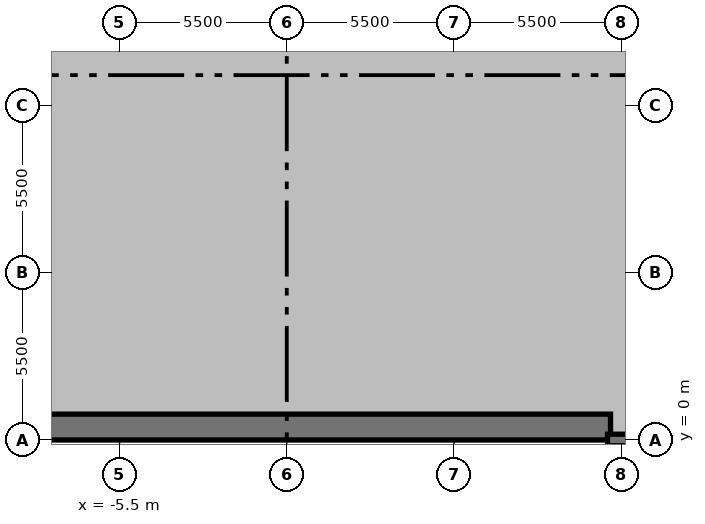
"""IFC4 building model, lengths in metres.
Left out: names, types, materials, properties, quantities, classifications, styles, units other than length and angle.
Written with IfcOpenShell. Run it as: python <this file> out.ifc"""

import sys

from ifc_helpers import new_model, si_unit, direction, frame, frame_2d, origin, origin_2d, place, context, subcontext, project, spatial, rectangle, extrude, source, transform, mapped, element, fill, save


model = new_model("IFC4")
c1 = context("Model", 3, precision=1e-05, world=origin(), true_north=direction((0.0, 1.0)))
c2 = subcontext(c1, "Body", "Model", "MODEL_VIEW")
j1 = project(units=[si_unit("LENGTHUNIT", "METRE"), si_unit("PLANEANGLEUNIT", "RADIAN")], contexts=[c1])
p1 = place(None, origin())
s1 = spatial("IfcSite", under=j1, at=p1, CompositionType="ELEMENT")
p2 = place(p1, origin())
s2 = spatial("IfcBuilding", under=s1, at=p2, CompositionType="ELEMENT")
p3 = place(p2, origin())
s3 = spatial("IfcBuildingStorey", under=s2, at=p3, CompositionType="ELEMENT", Elevation=0.0)
p4 = place(p3, frame((-10.65, 0.425, 0.0), z_axis=(0.0, 0.0, 1.0), x_axis=(1.0, 0.0, 0.0)))
e1 = element("IfcWall", 1, at=p4, inside=s3, PredefinedType="SHEAR", context=c2, shape_type="SweptSolid", body=[
    extrude(rectangle(XDim=21.3, YDim=0.85, at=frame_2d((10.65, 0.0))), origin(), (0.0, 0.0, 1.0), 5.15),
])
p5 = place(p3, frame((10.575, 0.425, 0.0), z_axis=(0.0, 0.0, 1.0), x_axis=(0.0, 1.0, 0.0)))
e2 = element("IfcWall", 2, at=p5, inside=s3, PredefinedType="SHEAR", context=c2, shape_type="SweptSolid", body=[
    extrude(rectangle(XDim=15.75, YDim=0.85, at=frame_2d((7.875, 0.0))), origin(), (0.0, 0.0, 1.0), 5.15),
])
p6 = place(p5, frame((9.125, 0.0, 0.0)))
e3 = element("IfcOpeningElement", 3, at=p6, cuts=e2, PredefinedType="OPENING", context=c2, shape_type="SweptSolid", body=[
    extrude(rectangle(XDim=1.1, YDim=2.2, at=frame_2d((0.55, 1.1))), frame((0.0, 0.435, 0.0), z_axis=(0.0, -1.0, 0.0), x_axis=(1.0, 0.0, 0.0)), (0.0, 0.0, 1.0), 0.87),
])
p7 = place(p3, frame((-5.5, 0.425, 0.0), z_axis=(0.0, 0.0, 1.0), x_axis=(0.0, 1.0, 0.0)))
e4 = element("IfcWall", 4, at=p7, inside=s3, PredefinedType="SHEAR", context=c2, shape_type="SweptSolid", body=[
    extrude(rectangle(XDim=15.75, YDim=0.4, at=frame_2d((7.875, 0.0))), origin(), (0.0, 0.0, 1.0), 5.15),
])
p8 = place(p7, frame((9.075, 0.0, 0.0)))
e5 = element("IfcOpeningElement", 5, at=p8, cuts=e4, PredefinedType="OPENING", context=c2, shape_type="SweptSolid", body=[
    extrude(rectangle(XDim=1.1, YDim=2.2, at=frame_2d((0.55, 1.1))), frame((0.0, 0.21, 0.0), z_axis=(0.0, -1.0, 0.0), x_axis=(1.0, 0.0, 0.0)), (0.0, 0.0, 1.0), 0.42),
])
p9 = place(p3, frame((5.5, 0.425, 0.0), z_axis=(0.0, 0.0, 1.0), x_axis=(0.0, 1.0, 0.0)))
e6 = element("IfcWall", 6, at=p9, inside=s3, PredefinedType="SHEAR", context=c2, shape_type="SweptSolid", body=[
    extrude(rectangle(XDim=15.75, YDim=0.4, at=frame_2d((7.875, 0.0))), origin(), (0.0, 0.0, 1.0), 5.15),
])
p10 = place(p9, frame((9.075, 0.0, 0.0)))
e7 = element("IfcOpeningElement", 7, at=p10, cuts=e6, PredefinedType="OPENING", context=c2, shape_type="SweptSolid", body=[
    extrude(rectangle(XDim=1.1, YDim=2.2, at=frame_2d((0.55, 1.1))), frame((0.0, 0.21, 0.0), z_axis=(0.0, -1.0, 0.0), x_axis=(1.0, 0.0, 0.0)), (0.0, 0.0, 1.0), 0.42),
])
m1 = source(origin(), c2, "Body", "SweptSolid", [
    extrude(rectangle(XDim=0.45, YDim=0.95, at=origin_2d()), origin(), (0.0, 0.0, 1.0), 5.5),
])
for number, where, z_axis, x_axis in (
    (8, (-5.5, 0.45, 0.0), (0.0, 0.0, 1.0), (1.0, 0.0, 0.0)),
    (9, (5.5, 0.45, 0.0), (0.0, 0.0, 1.0), (1.0, 0.0, 0.0)),
    (10, (10.65, 0.3, 0.0), (0.0, 0.0, 1.0), (1.0, 0.0, 0.0)),
):
    element("IfcColumn", number, at=place(p3, frame(where, z_axis=z_axis, x_axis=x_axis)), inside=s3, PredefinedType="PILASTER", context=c2, shape_type="MappedRepresentation", body=[
        mapped(m1, transform((0.0, 0.0, 0.0), scale=1.0)),
    ])
p11 = place(p3, frame((32.5, 0.0, 0.0), z_axis=(0.0, 0.0, 1.0), x_axis=(-1.0, 0.0, 0.0)))
e11 = element("IfcWall", 11, at=p11, inside=s3, PredefinedType="SOLIDWALL", context=c2, shape_type="SweptSolid", body=[
    extrude(rectangle(XDim=21.95, YDim=0.38, at=frame_2d((10.975, 0.0))), origin(), (0.0, 0.0, 1.0), 4.09),
])
p12 = place(p11, frame((12.05, 0.0, 0.0)))
e12 = element("IfcOpeningElement", 12, at=p12, cuts=e11, PredefinedType="OPENING", context=c2, shape_type="SweptSolid", body=[
    extrude(rectangle(XDim=1.9, YDim=2.3, at=frame_2d((0.95, 1.15))), frame((0.0, 0.2, 0.0), z_axis=(0.0, -1.0, 0.0), x_axis=(1.0, 0.0, 0.0)), (0.0, 0.0, 1.0), 0.4),
])
p13 = place(p3, frame((-6.85, 0.85, 0.0), z_axis=(0.0, 0.0, 1.0), x_axis=(0.0, 1.0, 0.0)))
e13 = element("IfcWall", 13, at=p13, inside=s3, PredefinedType="SOLIDWALL", context=c2, shape_type="SweptSolid", body=[
    extrude(rectangle(XDim=7.5, YDim=0.25, at=frame_2d((3.75, 0.0))), origin(), (0.0, 0.0, 1.0), 5.15),
])
p14 = place(p3, frame((-10.15, 8.35, 0.0), z_axis=(0.0, 0.0, 1.0), x_axis=(1.0, 0.0, 0.0)))
e14 = element("IfcWall", 14, at=p14, inside=s3, PredefinedType="SOLIDWALL", context=c2, shape_type="SweptSolid", body=[
    extrude(rectangle(XDim=4.65, YDim=0.22, at=frame_2d((2.325, 0.0))), origin(), (0.0, 0.0, 1.0), 5.15),
])
p15 = place(p14, frame((1.0, 0.0, 0.0)))
e15 = element("IfcOpeningElement", 15, at=p15, cuts=e14, PredefinedType="OPENING", context=c2, shape_type="SweptSolid", body=[
    extrude(rectangle(XDim=1.15, YDim=2.2, at=frame_2d((0.575, 1.1))), frame((0.0, 0.12, 0.0), z_axis=(0.0, -1.0, 0.0), x_axis=(1.0, 0.0, 0.0)), (0.0, 0.0, 1.0), 0.24),
])
p16 = place(p3, frame((-5.5, 11.87, 0.0), z_axis=(0.0, 0.0, 1.0), x_axis=(-1.0, 0.0, 0.0)))
e16 = element("IfcWall", 16, at=p16, inside=s3, PredefinedType="SOLIDWALL", context=c2, shape_type="SweptSolid", body=[
    extrude(rectangle(XDim=4.65, YDim=0.25, at=frame_2d((2.325, 0.0))), origin(), (0.0, 0.0, 1.0), 5.15),
])
p17 = place(p16, frame((2.95, 0.0, 0.0)))
e17 = element("IfcOpeningElement", 17, at=p17, cuts=e16, PredefinedType="OPENING", context=c2, shape_type="SweptSolid", body=[
    extrude(rectangle(XDim=1.2, YDim=2.25, at=frame_2d((0.6, 1.125))), frame((0.0, 0.135, 0.0), z_axis=(0.0, -1.0, 0.0), x_axis=(1.0, 0.0, 0.0)), (0.0, 0.0, 1.0), 0.27),
])
p18 = place(p3, frame((6.85, 0.85, 0.0), z_axis=(0.0, 0.0, 1.0), x_axis=(0.0, 1.0, 0.0)))
e18 = element("IfcWall", 18, at=p18, inside=s3, PredefinedType="SOLIDWALL", context=c2, shape_type="SweptSolid", body=[
    extrude(rectangle(XDim=7.5, YDim=0.25, at=frame_2d((3.75, 0.0))), origin(), (0.0, 0.0, 1.0), 5.15),
])
p19 = place(p3, frame((5.5, 8.35, 0.0), z_axis=(0.0, 0.0, 1.0), x_axis=(1.0, 0.0, 0.0)))
e19 = element("IfcWall", 19, at=p19, inside=s3, PredefinedType="SOLIDWALL", context=c2, shape_type="SweptSolid", body=[
    extrude(rectangle(XDim=4.65, YDim=0.22, at=frame_2d((2.325, 0.0))), origin(), (0.0, 0.0, 1.0), 5.15),
])
p20 = place(p19, frame((2.5, 0.0, 0.0)))
e20 = element("IfcOpeningElement", 20, at=p20, cuts=e19, PredefinedType="OPENING", context=c2, shape_type="SweptSolid", body=[
    extrude(rectangle(XDim=1.15, YDim=2.2, at=frame_2d((0.575, 1.1))), frame((0.0, 0.12, 0.0), z_axis=(0.0, -1.0, 0.0), x_axis=(1.0, 0.0, 0.0)), (0.0, 0.0, 1.0), 0.24),
])
p21 = place(p3, frame((10.15, 11.87, 0.0), z_axis=(0.0, 0.0, 1.0), x_axis=(-1.0, 0.0, 0.0)))
e21 = element("IfcWall", 21, at=p21, inside=s3, PredefinedType="SOLIDWALL", context=c2, shape_type="SweptSolid", body=[
    extrude(rectangle(XDim=4.65, YDim=0.25, at=frame_2d((2.325, 0.0))), origin(), (0.0, 0.0, 1.0), 5.15),
])
p22 = place(p21, frame((0.5, 0.0, 0.0)))
e22 = element("IfcOpeningElement", 22, at=p22, cuts=e21, PredefinedType="OPENING", context=c2, shape_type="SweptSolid", body=[
    extrude(rectangle(XDim=1.2, YDim=2.25, at=frame_2d((0.6, 1.125))), frame((0.0, 0.135, 0.0), z_axis=(0.0, -1.0, 0.0), x_axis=(1.0, 0.0, 0.0)), (0.0, 0.0, 1.0), 0.27),
])
p23 = place(p3, frame((7.84, 11.87, 0.0), z_axis=(0.0, 0.0, 1.0), x_axis=(0.0, 1.0, 0.0)))
e23 = element("IfcWall", 23, at=p23, inside=s3, PredefinedType="SOLIDWALL", context=c2, shape_type="SweptSolid", body=[
    extrude(rectangle(XDim=3.88, YDim=0.22, at=frame_2d((1.94, 0.0))), origin(), (0.0, 0.0, 1.0), 5.15),
])
p24 = place(p3, frame((-5.5, 3.05, 0.0), z_axis=(0.0, 0.0, 1.0), x_axis=(1.0, 0.0, 0.0)))
e24 = element("IfcWall", 24, at=p24, inside=s3, PredefinedType="SOLIDWALL", context=c2, shape_type="SweptSolid", body=[
    extrude(rectangle(XDim=7.32, YDim=0.22, at=frame_2d((3.66, 0.0))), origin(), (0.0, 0.0, 1.0), 5.15),
])
p25 = place(p24, frame((0.75, 0.0, 0.0)))
e25 = element("IfcOpeningElement", 25, at=p25, cuts=e24, PredefinedType="OPENING", context=c2, shape_type="SweptSolid", body=[
    extrude(rectangle(XDim=1.1, YDim=2.2, at=frame_2d((0.55, 1.1))), frame((0.0, 0.12, 0.0), z_axis=(0.0, -1.0, 0.0), x_axis=(1.0, 0.0, 0.0)), (0.0, 0.0, 1.0), 0.24),
])
p26 = place(p24, frame((3.15, 0.0, 0.0)))
e26 = element("IfcOpeningElement", 26, at=p26, cuts=e24, PredefinedType="OPENING", context=c2, shape_type="SweptSolid", body=[
    extrude(rectangle(XDim=1.1, YDim=2.2, at=frame_2d((0.55, 1.1))), frame((0.0, 0.12, 0.0), z_axis=(0.0, -1.0, 0.0), x_axis=(1.0, 0.0, 0.0)), (0.0, 0.0, 1.0), 0.24),
])
p27 = place(p24, frame((5.55, 0.0, 0.0)))
e27 = element("IfcOpeningElement", 27, at=p27, cuts=e24, PredefinedType="OPENING", context=c2, shape_type="SweptSolid", body=[
    extrude(rectangle(XDim=1.1, YDim=2.2, at=frame_2d((0.55, 1.1))), frame((0.0, 0.12, 0.0), z_axis=(0.0, -1.0, 0.0), x_axis=(1.0, 0.0, 0.0)), (0.0, 0.0, 1.0), 0.24),
])
p28 = place(p3, frame((1.8, 0.85, 0.0), z_axis=(0.0, 0.0, 1.0), x_axis=(0.0, 1.0, 0.0)))
e28 = element("IfcWall", 28, at=p28, inside=s3, PredefinedType="SOLIDWALL", context=c2, shape_type="SweptSolid", body=[
    extrude(rectangle(XDim=2.2, YDim=0.22, at=frame_2d((1.1, 0.0))), origin(), (0.0, 0.0, 1.0), 5.15),
])
for number, where, z_axis, x_axis in (
    (29, (-3.0, 0.85, 0.0), (0.0, 0.0, 1.0), (0.0, 1.0, 0.0)),
    (30, (-0.6, 0.85, 0.0), (0.0, 0.0, 1.0), (0.0, 1.0, 0.0)),
):
    element("IfcWall", number, at=place(p3, frame(where, z_axis=z_axis, x_axis=x_axis)), inside=s3, PredefinedType="SOLIDWALL", context=c2, shape_type="SweptSolid", body=[
        extrude(rectangle(XDim=2.2, YDim=0.18, at=frame_2d((1.1, 0.0))), origin(), (0.0, 0.0, 1.0), 5.15),
    ])
p29 = place(p3, frame((1.8, 3.16, 0.0), z_axis=(0.0, 0.0, 1.0), x_axis=(0.0, 1.0, 0.0)))
e31 = element("IfcWall", 31, at=p29, inside=s3, PredefinedType="PARTITIONING", context=c2, shape_type="SweptSolid", body=[
    extrude(rectangle(XDim=2.058, YDim=0.165, at=frame_2d((1.029, 0.0))), origin(), (0.0, 0.0, 1.0), 5.142),
])
p30 = place(p3, frame((3.54, 5.383, 0.0), z_axis=(0.0, 0.0, 1.0), x_axis=(0.0, 1.0, 0.0)))
e32 = element("IfcWall", 32, at=p30, inside=s3, PredefinedType="PARTITIONING", context=c2, shape_type="SweptSolid", body=[
    extrude(rectangle(XDim=2.875, YDim=0.165, at=frame_2d((1.438, 0.0))), origin(), (0.0, 0.0, 1.0), 5.142),
])
p31 = place(p30, frame((1.294, 0.0, 0.0)))
e33 = element("IfcOpeningElement", 33, at=p31, cuts=e32, PredefinedType="OPENING", context=c2, shape_type="SweptSolid", body=[
    extrude(rectangle(XDim=0.9, YDim=2.1, at=frame_2d((0.45, 1.05))), frame((0.0, 0.093, 0.0), z_axis=(0.0, -1.0, 0.0), x_axis=(1.0, 0.0, 0.0)), (0.0, 0.0, 1.0), 0.185),
])
p32 = place(p3, frame((3.54, 8.34, 0.0), z_axis=(0.0, 0.0, 1.0), x_axis=(1.0, 0.0, 0.0)))
e34 = element("IfcWall", 34, at=p32, inside=s3, PredefinedType="PARTITIONING", context=c2, shape_type="SweptSolid", body=[
    extrude(rectangle(XDim=1.88, YDim=0.165, at=frame_2d((0.94, 0.0))), origin(), (0.0, 0.0, 1.0), 5.142),
])
p33 = place(p3, frame((1.8, 5.3, 0.0), z_axis=(0.0, 0.0, 1.0), x_axis=(1.0, 0.0, 0.0)))
e35 = element("IfcWall", 35, at=p33, inside=s3, PredefinedType="PARTITIONING", context=c2, shape_type="SweptSolid", body=[
    extrude(rectangle(XDim=3.62, YDim=0.165, at=frame_2d((1.81, 0.0))), origin(), (0.0, 0.0, 1.0), 5.142),
])
p34 = place(p33, frame((0.48, 0.0, 0.0)))
e36 = element("IfcOpeningElement", 36, at=p34, cuts=e35, PredefinedType="OPENING", context=c2, shape_type="SweptSolid", body=[
    extrude(rectangle(XDim=0.9, YDim=2.1, at=frame_2d((0.45, 1.05))), frame((0.0, 0.093, 0.0), z_axis=(0.0, -1.0, 0.0), x_axis=(1.0, 0.0, 0.0)), (0.0, 0.0, 1.0), 0.185),
])
p35 = place(p3, frame((-5.5, 6.0, 0.0), z_axis=(0.0, 0.0, 1.0), x_axis=(1.0, 0.0, 0.0)))
e37 = element("IfcWall", 37, at=p35, inside=s3, PredefinedType="SOLIDWALL", context=c2, shape_type="SweptSolid", body=[
    extrude(rectangle(XDim=7.32, YDim=0.22, at=frame_2d((3.66, 0.0))), origin(), (0.0, 0.0, 1.0), 5.15),
])
p36 = place(p3, frame((-5.5, 8.3, 0.0), z_axis=(0.0, 0.0, 1.0), x_axis=(1.0, 0.0, 0.0)))
e38 = element("IfcWall", 38, at=p36, inside=s3, PredefinedType="SOLIDWALL", context=c2, shape_type="SweptSolid", body=[
    extrude(rectangle(XDim=7.32, YDim=0.22, at=frame_2d((3.66, 0.0))), origin(), (0.0, 0.0, 1.0), 5.15),
])
p37 = place(p36, frame((0.75, 0.0, 0.0)))
e39 = element("IfcOpeningElement", 39, at=p37, cuts=e38, PredefinedType="OPENING", context=c2, shape_type="SweptSolid", body=[
    extrude(rectangle(XDim=1.1, YDim=2.2, at=frame_2d((0.55, 1.1))), frame((0.0, 0.12, 0.0), z_axis=(0.0, -1.0, 0.0), x_axis=(1.0, 0.0, 0.0)), (0.0, 0.0, 1.0), 0.24),
])
p38 = place(p36, frame((3.15, 0.0, 0.0)))
e40 = element("IfcOpeningElement", 40, at=p38, cuts=e38, PredefinedType="OPENING", context=c2, shape_type="SweptSolid", body=[
    extrude(rectangle(XDim=1.1, YDim=2.2, at=frame_2d((0.55, 1.1))), frame((0.0, 0.12, 0.0), z_axis=(0.0, -1.0, 0.0), x_axis=(1.0, 0.0, 0.0)), (0.0, 0.0, 1.0), 0.24),
])
p39 = place(p36, frame((5.55, 0.0, 0.0)))
e41 = element("IfcOpeningElement", 41, at=p39, cuts=e38, PredefinedType="OPENING", context=c2, shape_type="SweptSolid", body=[
    extrude(rectangle(XDim=1.1, YDim=2.2, at=frame_2d((0.55, 1.1))), frame((0.0, 0.12, 0.0), z_axis=(0.0, -1.0, 0.0), x_axis=(1.0, 0.0, 0.0)), (0.0, 0.0, 1.0), 0.24),
])
p40 = place(p3, frame((1.8, 6.0, 0.0), z_axis=(0.0, 0.0, 1.0), x_axis=(0.0, 1.0, 0.0)))
e42 = element("IfcWall", 42, at=p40, inside=s3, PredefinedType="SOLIDWALL", context=c2, shape_type="SweptSolid", body=[
    extrude(rectangle(XDim=2.3, YDim=0.22, at=frame_2d((1.15, 0.0))), origin(), (0.0, 0.0, 1.0), 5.15),
])
for number, where, z_axis, x_axis in (
    (43, (-3.0, 6.0, 0.0), (0.0, 0.0, 1.0), (0.0, 1.0, 0.0)),
    (44, (-0.6, 6.0, 0.0), (0.0, 0.0, 1.0), (0.0, 1.0, 0.0)),
):
    element("IfcWall", number, at=place(p3, frame(where, z_axis=z_axis, x_axis=x_axis)), inside=s3, PredefinedType="SOLIDWALL", context=c2, shape_type="SweptSolid", body=[
        extrude(rectangle(XDim=2.3, YDim=0.18, at=frame_2d((1.15, 0.0))), origin(), (0.0, 0.0, 1.0), 5.15),
    ])
p41 = place(p3, frame((-5.5, 11.32, 0.0), z_axis=(0.0, 0.0, 1.0), x_axis=(1.0, 0.0, 0.0)))
e45 = element("IfcWall", 45, at=p41, inside=s3, PredefinedType="SOLIDWALL", context=c2, shape_type="SweptSolid", body=[
    extrude(rectangle(XDim=7.32, YDim=0.22, at=frame_2d((3.66, 0.0))), origin(), (0.0, 0.0, 1.0), 5.15),
])
p42 = place(p3, frame((1.8, 11.32, 0.0), z_axis=(0.0, 0.0, 1.0), x_axis=(0.0, 1.0, 0.0)))
e46 = element("IfcWall", 46, at=p42, inside=s3, PredefinedType="SOLIDWALL", context=c2, shape_type="SweptSolid", body=[
    extrude(rectangle(XDim=2.3, YDim=0.22, at=frame_2d((1.15, 0.0))), origin(), (0.0, 0.0, 1.0), 5.15),
])
for number, where, z_axis, x_axis in (
    (47, (-3.0, 11.32, 0.0), (0.0, 0.0, 1.0), (0.0, 1.0, 0.0)),
    (48, (-0.6, 11.32, 0.0), (0.0, 0.0, 1.0), (0.0, 1.0, 0.0)),
):
    element("IfcWall", number, at=place(p3, frame(where, z_axis=z_axis, x_axis=x_axis)), inside=s3, PredefinedType="SOLIDWALL", context=c2, shape_type="SweptSolid", body=[
        extrude(rectangle(XDim=2.3, YDim=0.18, at=frame_2d((1.15, 0.0))), origin(), (0.0, 0.0, 1.0), 5.15),
    ])
p43 = place(p3, frame((3.54, 11.22, 0.0), z_axis=(0.0, 0.0, 1.0), x_axis=(0.0, 1.0, 0.0)))
e49 = element("IfcWall", 49, at=p43, inside=s3, PredefinedType="PARTITIONING", context=c2, shape_type="SweptSolid", body=[
    extrude(rectangle(XDim=4.53, YDim=0.165, at=frame_2d((2.265, 0.0))), origin(), (0.0, 0.0, 1.0), 5.142),
])
p44 = place(p43, frame((0.55, 0.0, 0.0)))
e50 = element("IfcOpeningElement", 50, at=p44, cuts=e49, PredefinedType="OPENING", context=c2, shape_type="SweptSolid", body=[
    extrude(rectangle(XDim=0.9, YDim=2.1, at=frame_2d((0.45, 1.05))), frame((0.0, 0.093, 0.0), z_axis=(0.0, -1.0, 0.0), x_axis=(1.0, 0.0, 0.0)), (0.0, 0.0, 1.0), 0.185),
])
p45 = place(p43, frame((2.85, 0.0, 0.0)))
e51 = element("IfcOpeningElement", 51, at=p45, cuts=e49, PredefinedType="OPENING", context=c2, shape_type="SweptSolid", body=[
    extrude(rectangle(XDim=0.9, YDim=2.1, at=frame_2d((0.45, 1.05))), frame((0.0, 0.093, 0.0), z_axis=(0.0, -1.0, 0.0), x_axis=(1.0, 0.0, 0.0)), (0.0, 0.0, 1.0), 0.185),
])
p46 = place(p3, frame((3.54, 11.22, 0.0), z_axis=(0.0, 0.0, 1.0), x_axis=(1.0, 0.0, 0.0)))
e52 = element("IfcWall", 52, at=p46, inside=s3, PredefinedType="PARTITIONING", context=c2, shape_type="SweptSolid", body=[
    extrude(rectangle(XDim=1.88, YDim=0.165, at=frame_2d((0.94, 0.0))), origin(), (0.0, 0.0, 1.0), 5.142),
])
p47 = place(p3, frame((11.02, 5.8, 0.0), z_axis=(0.0, 0.0, 1.0), x_axis=(1.0, 0.0, 0.0)))
e53 = element("IfcWall", 53, at=p47, inside=s3, PredefinedType="SOLIDWALL", context=c2, shape_type="SweptSolid", body=[
    extrude(rectangle(XDim=6.18, YDim=0.22, at=frame_2d((3.09, 0.0))), origin(), (0.0, 0.0, 1.0), 5.142),
])
p48 = place(p47, frame((2.54, 0.0, 0.0)))
e54 = element("IfcOpeningElement", 54, at=p48, cuts=e53, PredefinedType="OPENING", context=c2, shape_type="SweptSolid", body=[
    extrude(rectangle(XDim=1.1, YDim=2.2, at=frame_2d((0.55, 1.1))), frame((0.0, 0.12, 0.0), z_axis=(0.0, -1.0, 0.0), x_axis=(1.0, 0.0, 0.0)), (0.0, 0.0, 1.0), 0.24),
])
m2 = source(origin(), c2, "Body", "SweptSolid", [
    extrude(rectangle(XDim=1.1, YDim=2.2, at=frame_2d((0.55, 1.1))), frame((0.0, 0.025, 0.0), z_axis=(0.0, -1.0, 0.0), x_axis=(1.0, 0.0, 0.0)), (0.0, 0.0, 1.0), 0.05),
])
p49 = place(p8, origin())
e55 = element("IfcDoor", 55, at=p49, inside=s3, OperationType="SINGLE_SWING_RIGHT", PredefinedType="DOOR", context=c2, shape_type="MappedRepresentation", body=[
    mapped(m2, transform((0.0, 0.0, 0.0), scale=1.0)),
])
fill(e5, e55)
m3 = source(origin(), c2, "Body", "SweptSolid", [
    extrude(rectangle(XDim=1.15, YDim=2.2, at=frame_2d((0.575, 1.1))), frame((0.0, 0.025, 0.0), z_axis=(0.0, -1.0, 0.0), x_axis=(1.0, 0.0, 0.0)), (0.0, 0.0, 1.0), 0.05),
])
p50 = place(p20, origin())
e56 = element("IfcDoor", 56, at=p50, inside=s3, OperationType="SINGLE_SWING_LEFT", PredefinedType="DOOR", context=c2, shape_type="MappedRepresentation", body=[
    mapped(m3, transform((0.0, 0.0, 0.0), scale=1.0)),
])
fill(e20, e56)
p51 = place(p10, origin())
e57 = element("IfcDoor", 57, at=p51, inside=s3, OperationType="SINGLE_SWING_RIGHT", PredefinedType="DOOR", context=c2, shape_type="MappedRepresentation", body=[
    mapped(m2, transform((0.0, 0.0, 0.0), scale=1.0)),
])
fill(e7, e57)
p52 = place(p6, origin())
e58 = element("IfcDoor", 58, at=p52, inside=s3, OperationType="SINGLE_SWING_RIGHT", PredefinedType="DOOR", context=c2, shape_type="MappedRepresentation", body=[
    mapped(m2, transform((0.0, 0.0, 0.0), scale=1.0)),
])
fill(e3, e58)
m4 = source(origin(), c2, "Body", "SweptSolid", [
    extrude(rectangle(XDim=1.2, YDim=2.25, at=frame_2d((0.6, 1.125))), frame((0.0, 0.025, 0.0), z_axis=(0.0, -1.0, 0.0), x_axis=(1.0, 0.0, 0.0)), (0.0, 0.0, 1.0), 0.05),
])
p53 = place(p22, origin())
e59 = element("IfcDoor", 59, at=p53, inside=s3, OperationType="SLIDING_TO_RIGHT", PredefinedType="DOOR", context=c2, shape_type="MappedRepresentation", body=[
    mapped(m4, transform((0.0, 0.0, 0.0), scale=1.0)),
])
fill(e22, e59)
m5 = source(origin(), c2, "Body", "SweptSolid", [
    extrude(rectangle(XDim=1.1, YDim=2.2, at=frame_2d((0.55, 1.1))), frame((0.0, 0.025, 0.0), z_axis=(0.0, -1.0, 0.0), x_axis=(1.0, 0.0, 0.0)), (0.0, 0.0, 1.0), 0.05),
])
p54 = place(p25, origin())
e60 = element("IfcDoor", 60, at=p54, inside=s3, OperationType="SLIDING_TO_RIGHT", PredefinedType="DOOR", context=c2, shape_type="MappedRepresentation", body=[
    mapped(m5, transform((0.0, 0.0, 0.0), scale=1.0)),
])
fill(e25, e60)
p55 = place(p26, origin())
e61 = element("IfcDoor", 61, at=p55, inside=s3, OperationType="SLIDING_TO_RIGHT", PredefinedType="DOOR", context=c2, shape_type="MappedRepresentation", body=[
    mapped(m5, transform((0.0, 0.0, 0.0), scale=1.0)),
])
fill(e26, e61)
p56 = place(p27, origin())
e62 = element("IfcDoor", 62, at=p56, inside=s3, OperationType="SLIDING_TO_RIGHT", PredefinedType="DOOR", context=c2, shape_type="MappedRepresentation", body=[
    mapped(m5, transform((0.0, 0.0, 0.0), scale=1.0)),
])
fill(e27, e62)
m6 = source(origin(), c2, "Body", "SweptSolid", [
    extrude(rectangle(XDim=0.9, YDim=2.1, at=frame_2d((0.45, 1.05))), frame((0.0, 0.025, 0.0), z_axis=(0.0, -1.0, 0.0), x_axis=(1.0, 0.0, 0.0)), (0.0, 0.0, 1.0), 0.05),
])
p57 = place(p34, origin())
e63 = element("IfcDoor", 63, at=p57, inside=s3, OperationType="SINGLE_SWING_LEFT", PredefinedType="DOOR", context=c2, shape_type="MappedRepresentation", body=[
    mapped(m6, transform((0.0, 0.0, 0.0), scale=1.0)),
])
fill(e36, e63)
p58 = place(p31, origin())
e64 = element("IfcDoor", 64, at=p58, inside=s3, OperationType="SINGLE_SWING_RIGHT", PredefinedType="DOOR", context=c2, shape_type="MappedRepresentation", body=[
    mapped(m6, transform((0.0, 0.0, 0.0), scale=1.0)),
])
fill(e33, e64)
p59 = place(p37, origin())
e65 = element("IfcDoor", 65, at=p59, inside=s3, OperationType="SLIDING_TO_LEFT", PredefinedType="DOOR", context=c2, shape_type="MappedRepresentation", body=[
    mapped(m5, transform((0.0, 0.0, 0.0), scale=1.0)),
])
fill(e39, e65)
p60 = place(p38, origin())
e66 = element("IfcDoor", 66, at=p60, inside=s3, OperationType="SLIDING_TO_LEFT", PredefinedType="DOOR", context=c2, shape_type="MappedRepresentation", body=[
    mapped(m5, transform((0.0, 0.0, 0.0), scale=1.0)),
])
fill(e40, e66)
p61 = place(p39, origin())
e67 = element("IfcDoor", 67, at=p61, inside=s3, OperationType="SLIDING_TO_LEFT", PredefinedType="DOOR", context=c2, shape_type="MappedRepresentation", body=[
    mapped(m5, transform((0.0, 0.0, 0.0), scale=1.0)),
])
fill(e41, e67)
p62 = place(p44, origin())
e68 = element("IfcDoor", 68, at=p62, inside=s3, OperationType="SINGLE_SWING_LEFT", PredefinedType="DOOR", context=c2, shape_type="MappedRepresentation", body=[
    mapped(m6, transform((0.0, 0.0, 0.0), scale=1.0)),
])
fill(e50, e68)
save(model, sys.argv[1])
